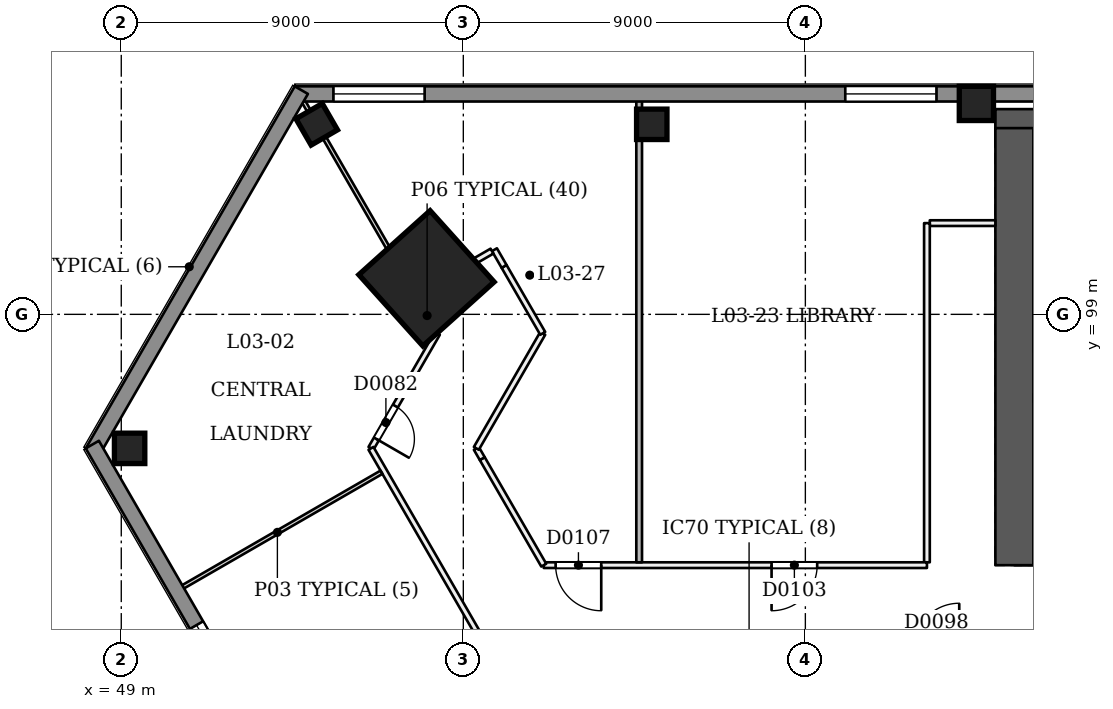
"""IFC4 building model, lengths in metres.
Left out: names, types, materials, properties, quantities, classifications, styles, units other than length and angle.
Written with IfcOpenShell. Run it as: python <this file> out.ifc"""

import sys

from ifc_helpers import new_model, si_unit, direction, frame, frame_2d, origin, origin_2d, place, context, subcontext, project, spatial, rectangle, extrude, element, fill, save


model = new_model("IFC4")
c1 = context("Model", 3, precision=1e-05, world=origin(), true_north=direction((0.0, 1.0)))
c2 = subcontext(c1, "Body", "Model", "MODEL_VIEW")
j1 = project(units=[si_unit("LENGTHUNIT", "METRE"), si_unit("PLANEANGLEUNIT", "RADIAN")], contexts=[c1])
p1 = place(None, origin())
s1 = spatial("IfcSite", under=j1, at=p1, CompositionType="ELEMENT")
p2 = place(p1, origin())
s2 = spatial("IfcBuilding", under=s1, at=p2, CompositionType="ELEMENT")
p3 = place(p2, frame((0.0, 0.0, 18.0)))
s3 = spatial("IfcBuildingStorey", under=s2, at=p3, CompositionType="ELEMENT", Elevation=18.0)
p4 = place(p3, frame((72.5, 92.9, 0.0), z_axis=(0.0, 0.0, 1.0), x_axis=(1.0, 0.0, 0.0)))
e1 = element("IfcWall", 1, at=p4, inside=s3, PredefinedType="SHEAR", context=c2, shape_type="SweptSolid", body=[
    extrude(rectangle(XDim=25.5, YDim=1.0, at=frame_2d((12.75, 0.0))), origin(), (0.0, 0.0, 1.0), 4.5),
])
p5 = place(p4, frame((1.3, 0.0, 0.0)))
e2 = element("IfcOpeningElement", 2, at=p5, cuts=e1, PredefinedType="OPENING", context=c2, shape_type="SweptSolid", body=[
    extrude(rectangle(XDim=1.2, YDim=2.1, at=frame_2d((0.6, 1.05))), frame((0.0, 0.51, 0.0), z_axis=(0.0, -1.0, 0.0), x_axis=(1.0, 0.0, 0.0)), (0.0, 0.0, 1.0), 1.021),
])
p6 = place(p4, frame((3.5, 0.0, 0.0)))
e3 = element("IfcOpeningElement", 3, at=p6, cuts=e1, PredefinedType="OPENING", context=c2, shape_type="SweptSolid", body=[
    extrude(rectangle(XDim=1.2, YDim=2.1, at=frame_2d((0.6, 1.05))), frame((0.0, 0.51, 0.0), z_axis=(0.0, -1.0, 0.0), x_axis=(1.0, 0.0, 0.0)), (0.0, 0.0, 1.0), 1.021),
])
p7 = place(p4, frame((13.5, 0.0, 0.0)))
e4 = element("IfcOpeningElement", 4, at=p7, cuts=e1, PredefinedType="OPENING", context=c2, shape_type="SweptSolid", body=[
    extrude(rectangle(XDim=1.2, YDim=2.1, at=frame_2d((0.6, 1.05))), frame((0.0, 0.51, 0.0), z_axis=(0.0, -1.0, 0.0), x_axis=(1.0, 0.0, 0.0)), (0.0, 0.0, 1.0), 1.021),
])
p8 = place(p4, frame((15.562, 0.0, 0.0)))
e5 = element("IfcOpeningElement", 5, at=p8, cuts=e1, PredefinedType="OPENING", context=c2, shape_type="SweptSolid", body=[
    extrude(rectangle(XDim=1.0, YDim=2.1, at=frame_2d((0.5, 1.05))), frame((0.0, 0.51, 0.0), z_axis=(0.0, -1.0, 0.0), x_axis=(1.0, 0.0, 0.0)), (0.0, 0.0, 1.0), 1.021),
])
p9 = place(p4, frame((17.8, 0.0, 0.0)))
e6 = element("IfcOpeningElement", 6, at=p9, cuts=e1, PredefinedType="OPENING", context=c2, shape_type="SweptSolid", body=[
    extrude(rectangle(XDim=1.0, YDim=2.1, at=frame_2d((0.5, 1.05))), frame((0.0, 0.51, 0.0), z_axis=(0.0, -1.0, 0.0), x_axis=(1.0, 0.0, 0.0)), (0.0, 0.0, 1.0), 1.021),
])
p10 = place(p4, frame((20.35, 0.0, 0.0)))
e7 = element("IfcOpeningElement", 7, at=p10, cuts=e1, PredefinedType="OPENING", context=c2, shape_type="SweptSolid", body=[
    extrude(rectangle(XDim=1.0, YDim=2.1, at=frame_2d((0.5, 1.05))), frame((0.0, 0.51, 0.0), z_axis=(0.0, -1.0, 0.0), x_axis=(1.0, 0.0, 0.0)), (0.0, 0.0, 1.0), 1.021),
])
p11 = place(p4, frame((22.837, 0.0, 0.0)))
e8 = element("IfcOpeningElement", 8, at=p11, cuts=e1, PredefinedType="OPENING", context=c2, shape_type="SweptSolid", body=[
    extrude(rectangle(XDim=1.0, YDim=2.1, at=frame_2d((0.5, 1.05))), frame((0.0, 0.51, 0.0), z_axis=(0.0, -1.0, 0.0), x_axis=(1.0, 0.0, 0.0)), (0.0, 0.0, 1.0), 1.021),
])
p12 = place(p3, frame((97.5, 103.9, 0.0), z_axis=(0.0, 0.0, 1.0), x_axis=(-1.0, 0.0, 0.0)))
e9 = element("IfcWall", 9, at=p12, inside=s3, PredefinedType="SHEAR", context=c2, shape_type="SweptSolid", body=[
    extrude(rectangle(XDim=25.5, YDim=1.0, at=frame_2d((12.75, 0.0))), origin(), (0.0, 0.0, 1.0), 4.5),
])
p13 = place(p3, frame((72.5, 103.9, 0.0), z_axis=(0.0, 0.0, 1.0), x_axis=(0.0, -1.0, 0.0)))
e10 = element("IfcWall", 10, at=p13, inside=s3, PredefinedType="SHEAR", context=c2, shape_type="SweptSolid", body=[
    extrude(rectangle(XDim=11.5, YDim=1.0, at=frame_2d((5.75, 0.0))), origin(), (0.0, 0.0, 1.0), 4.5),
])
p14 = place(p3, frame((56.997, 99.937, 0.0), z_axis=(0.028416116488, 0.009273198319, 0.999553166228), x_axis=(-0.865919141901, 0.499784777633, 0.019980383755)))
e11 = element("IfcColumn", 11, at=p14, inside=s3, PredefinedType="COLUMN", context=c2, shape_type="SweptSolid", body=[
    extrude(rectangle(XDim=2.52, YDim=2.52, at=origin_2d()), origin(), (0.0, 0.0, 1.0), 4.502),
])
p15 = place(p3, frame((71.5, 104.55, 0.0), z_axis=(0.0, 0.0, 1.0), x_axis=(1.0, 0.0, 0.0)))
e12 = element("IfcColumn", 12, at=p15, inside=s3, PredefinedType="COLUMN", context=c2, shape_type="SweptSolid", body=[
    extrude(rectangle(XDim=0.9, YDim=0.9, at=origin_2d()), origin(), (0.0, 0.0, 1.0), 4.5),
])
for number, where, z_axis, x_axis in (
    (13, (62.959, 104.0, 0.0), (0.0, 0.0, 1.0), (1.0, 0.0, 0.0)),
    (14, (54.142, 104.0, 0.0), (0.0, 0.0, 1.0), (0.866, 0.5, 0.0)),
    (15, (49.219, 95.474, 0.0), (0.0, 0.0, 1.0), (1.0, 1.745e-08, 0.0)),
):
    element("IfcColumn", number, at=place(p3, frame(where, z_axis=z_axis, x_axis=x_axis)), inside=s3, PredefinedType="COLUMN", context=c2, shape_type="SweptSolid", body=[
        extrude(rectangle(XDim=0.8, YDim=0.8, at=origin_2d()), origin(), (0.0, 0.0, 1.0), 4.5),
    ])
p16 = place(p3, frame((56.777, 99.436, 0.0), z_axis=(0.0, 0.0, 1.0), x_axis=(0.500172206961, -0.865925957218, 0.0)))
e16 = element("IfcWall", 16, at=p16, inside=s3, PredefinedType="PARTITIONING", context=c2, shape_type="SweptSolid", body=[
    extrude(rectangle(XDim=1.081, YDim=0.15, at=frame_2d((0.54, 0.0))), origin(), (0.0, 0.0, 1.0), 3.55),
])
p17 = place(p3, frame((57.318, 98.5, 0.0), z_axis=(0.0, 0.0, 1.0), x_axis=(-0.500038954607, -0.866002912163, 0.0)))
e17 = element("IfcWall", 17, at=p17, inside=s3, PredefinedType="PARTITIONING", context=c2, shape_type="SweptSolid", body=[
    extrude(rectangle(XDim=3.494, YDim=0.15, at=frame_2d((1.747, 0.0))), origin(), (0.0, 0.0, 1.0), 3.55),
])
p18 = place(p17, frame((2.209, 0.0, 0.0)))
e18 = element("IfcOpeningElement", 18, at=p18, cuts=e17, PredefinedType="OPENING", context=c2, shape_type="SweptSolid", body=[
    extrude(rectangle(XDim=1.0, YDim=2.1, at=frame_2d((0.5, 1.05))), frame((0.0, 0.085, 0.0), z_axis=(0.0, -1.0, 0.0), x_axis=(1.0, 0.0, 0.0)), (0.0, 0.0, 1.0), 0.171),
])
p19 = place(p3, frame((55.57, 95.474, 0.0), z_axis=(0.0, 0.0, 1.0), x_axis=(0.500000085768, -0.866025354266, 0.0)))
e19 = element("IfcWall", 19, at=p19, inside=s3, PredefinedType="PARTITIONING", context=c2, shape_type="SweptSolid", body=[
    extrude(rectangle(XDim=55.365, YDim=0.15, at=frame_2d((27.682, 0.0))), origin(), (0.0, 0.0, 1.0), 3.55),
])
p20 = place(p19, frame((9.082, 0.0, 0.0)))
e20 = element("IfcOpeningElement", 20, at=p20, cuts=e19, PredefinedType="OPENING", context=c2, shape_type="SweptSolid", body=[
    extrude(rectangle(XDim=1.2, YDim=2.1, at=frame_2d((0.6, 1.05))), frame((0.0, 0.085, 0.0), z_axis=(0.0, -1.0, 0.0), x_axis=(1.0, 0.0, 0.0)), (0.0, 0.0, 1.0), 0.171),
])
p21 = place(p19, frame((18.906, 0.0, 0.0)))
e21 = element("IfcOpeningElement", 21, at=p21, cuts=e19, PredefinedType="OPENING", context=c2, shape_type="SweptSolid", body=[
    extrude(rectangle(XDim=0.9, YDim=2.1, at=frame_2d((0.45, 1.05))), frame((0.0, 0.085, 0.0), z_axis=(0.0, -1.0, 0.0), x_axis=(1.0, 0.0, 0.0)), (0.0, 0.0, 1.0), 0.171),
])
p22 = place(p19, frame((21.856, 0.0, 0.0)))
e22 = element("IfcOpeningElement", 22, at=p22, cuts=e19, PredefinedType="OPENING", context=c2, shape_type="SweptSolid", body=[
    extrude(rectangle(XDim=0.9, YDim=2.1, at=frame_2d((0.45, 1.05))), frame((0.0, 0.085, 0.0), z_axis=(0.0, -1.0, 0.0), x_axis=(1.0, 0.0, 0.0)), (0.0, 0.0, 1.0), 0.171),
])
p23 = place(p19, frame((31.582, 0.0, 0.0)))
e23 = element("IfcOpeningElement", 23, at=p23, cuts=e19, PredefinedType="OPENING", context=c2, shape_type="SweptSolid", body=[
    extrude(rectangle(XDim=1.2, YDim=2.1, at=frame_2d((0.6, 1.05))), frame((0.0, 0.085, 0.0), z_axis=(0.0, -1.0, 0.0), x_axis=(1.0, 0.0, 0.0)), (0.0, 0.0, 1.0), 0.171),
])
p24 = place(p19, frame((45.082, 0.0, 0.0)))
e24 = element("IfcOpeningElement", 24, at=p24, cuts=e19, PredefinedType="OPENING", context=c2, shape_type="SweptSolid", body=[
    extrude(rectangle(XDim=1.2, YDim=2.1, at=frame_2d((0.6, 1.05))), frame((0.0, 0.085, 0.0), z_axis=(0.0, -1.0, 0.0), x_axis=(1.0, 0.0, 0.0)), (0.0, 0.0, 1.0), 0.171),
])
p25 = place(p19, frame((53.195, 0.0, 0.0)))
e25 = element("IfcOpeningElement", 25, at=p25, cuts=e19, PredefinedType="OPENING", context=c2, shape_type="SweptSolid", body=[
    extrude(rectangle(XDim=1.2, YDim=2.1, at=frame_2d((0.6, 1.05))), frame((0.0, 0.085, 0.0), z_axis=(0.0, -1.0, 0.0), x_axis=(1.0, 0.0, 0.0)), (0.0, 0.0, 1.0), 0.171),
])
p26 = place(p3, frame((72.0, 101.401, 0.0), z_axis=(0.0, 0.0, 1.0), x_axis=(-0.999999909973, -0.000424328109, 0.0)))
e26 = element("IfcWall", 26, at=p26, inside=s3, PredefinedType="PARTITIONING", context=c2, shape_type="SweptSolid", body=[
    extrude(rectangle(XDim=1.726, YDim=0.15, at=frame_2d((0.863, 0.0))), origin(), (0.0, 0.0, 1.0), 4.05),
])
p27 = place(p3, frame((70.199, 101.4, 0.0), z_axis=(0.0, 0.0, 1.0), x_axis=(0.0, -1.0, 0.0)))
e27 = element("IfcWall", 27, at=p27, inside=s3, PredefinedType="PARTITIONING", context=c2, shape_type="SweptSolid", body=[
    extrude(rectangle(XDim=8.924, YDim=0.15, at=frame_2d((4.462, 0.0))), origin(), (0.0, 0.0, 1.0), 4.05),
])
p28 = place(p3, frame((70.199, 92.401, 0.0), z_axis=(0.0, 0.0, 1.0), x_axis=(-1.0, 0.0, 0.0)))
e28 = element("IfcWall", 28, at=p28, inside=s3, PredefinedType="PARTITIONING", context=c2, shape_type="SweptSolid", body=[
    extrude(rectangle(XDim=10.082, YDim=0.15, at=frame_2d((5.041, 0.0))), origin(), (0.0, 0.0, 1.0), 4.05),
])
p29 = place(p28, frame((2.888, 0.0, 0.0)))
e29 = element("IfcOpeningElement", 29, at=p29, cuts=e28, PredefinedType="OPENING", context=c2, shape_type="SweptSolid", body=[
    extrude(rectangle(XDim=1.2, YDim=2.1, at=frame_2d((0.6, 1.05))), frame((0.0, 0.085, 0.0), z_axis=(0.0, -1.0, 0.0), x_axis=(1.0, 0.0, 0.0)), (0.0, 0.0, 1.0), 0.171),
])
p30 = place(p28, frame((8.57, 0.0, 0.0)))
e30 = element("IfcOpeningElement", 30, at=p30, cuts=e28, PredefinedType="OPENING", context=c2, shape_type="SweptSolid", body=[
    extrude(rectangle(XDim=1.2, YDim=2.1, at=frame_2d((0.6, 1.05))), frame((0.0, 0.085, 0.0), z_axis=(0.0, -1.0, 0.0), x_axis=(1.0, 0.0, 0.0)), (0.0, 0.0, 1.0), 0.171),
])
p31 = place(p3, frame((60.117, 92.401, 0.0), z_axis=(0.0, 0.0, 1.0), x_axis=(-0.499968406128, 0.866043643747, 0.0)))
e31 = element("IfcWall", 31, at=p31, inside=s3, PredefinedType="PARTITIONING", context=c2, shape_type="SweptSolid", body=[
    extrude(rectangle(XDim=3.237, YDim=0.15, at=frame_2d((1.618, 0.0))), origin(), (0.0, 0.0, 1.0), 4.05),
])
p32 = place(p3, frame((58.499, 95.204, 0.0), z_axis=(0.0, 0.0, 1.0), x_axis=(-0.500016430238, 0.866015917575, 0.0)))
e32 = element("IfcWall", 32, at=p32, inside=s3, PredefinedType="PARTITIONING", context=c2, shape_type="SweptSolid", body=[
    extrude(rectangle(XDim=0.312, YDim=0.15, at=frame_2d((0.156, 0.0))), origin(), (0.0, 0.0, 1.0), 3.55),
])
p33 = place(p3, frame((58.343, 95.474, 0.0), z_axis=(0.0, 0.0, 1.0), x_axis=(0.499956301907, 0.86605063142, 0.0)))
e33 = element("IfcWall", 33, at=p33, inside=s3, PredefinedType="PARTITIONING", context=c2, shape_type="SweptSolid", body=[
    extrude(rectangle(XDim=3.494, YDim=0.15, at=frame_2d((1.747, 0.0))), origin(), (0.0, 0.0, 1.0), 3.55),
])
p34 = place(p3, frame((60.09, 98.5, 0.0), z_axis=(0.0, 0.0, 1.0), x_axis=(-0.499933676373, 0.866063692362, 0.0)))
e34 = element("IfcWall", 34, at=p34, inside=s3, PredefinedType="PARTITIONING", context=c2, shape_type="SweptSolid", body=[
    extrude(rectangle(XDim=2.034, YDim=0.15, at=frame_2d((1.017, 0.0))), origin(), (0.0, 0.0, 1.0), 4.05),
])
p35 = place(p3, frame((59.073, 100.262, 0.0), z_axis=(0.0, 0.0, 1.0), x_axis=(-0.500181256421, 0.865920730047, 0.0)))
e35 = element("IfcWall", 35, at=p35, inside=s3, PredefinedType="PARTITIONING", context=c2, shape_type="SweptSolid", body=[
    extrude(rectangle(XDim=0.507, YDim=0.15, at=frame_2d((0.253, 0.0))), origin(), (0.0, 0.0, 1.0), 3.55),
])
p36 = place(p3, frame((58.754, 100.663, 0.0), z_axis=(0.0, 0.0, 1.0), x_axis=(-0.866220535422, -0.499661869681, 0.0)))
e36 = element("IfcWall", 36, at=p36, inside=s3, PredefinedType="PARTITIONING", context=c2, shape_type="SweptSolid", body=[
    extrude(rectangle(XDim=2.326, YDim=0.15, at=frame_2d((1.163, 0.0))), origin(), (0.0, 0.0, 1.0), 3.55),
])
p37 = place(p3, frame((50.369, 91.683, 0.0), z_axis=(0.0, 0.0, 1.0), x_axis=(0.866025537322, 0.499999768706, 0.0)))
e37 = element("IfcWall", 37, at=p37, inside=s3, PredefinedType="PARTITIONING", context=c2, shape_type="SweptSolid", body=[
    extrude(rectangle(XDim=6.325, YDim=0.1, at=frame_2d((3.163, 0.0))), origin(), (0.0, 0.0, 1.0), 4.05),
])
p38 = place(p3, frame((56.74, 99.501, 0.0), z_axis=(0.0, 0.0, 1.0), x_axis=(-0.500013984911, 0.866017329442, 0.0)))
e38 = element("IfcWall", 38, at=p38, inside=s3, PredefinedType="PARTITIONING", context=c2, shape_type="SweptSolid", body=[
    extrude(rectangle(XDim=6.234, YDim=0.1, at=frame_2d((3.117, 0.0))), origin(), (0.0, 0.0, 1.0), 4.05),
])
p39 = place(p3, frame((62.627, 104.9, 0.0), z_axis=(0.0, 0.0, 1.0), x_axis=(0.0, -1.0, 0.0)))
e39 = element("IfcWall", 39, at=p39, inside=s3, PredefinedType="PARTITIONING", context=c2, shape_type="SweptSolid", body=[
    extrude(rectangle(XDim=12.424, YDim=0.15, at=frame_2d((6.212, 0.0))), origin(), (0.0, 0.0, 1.0), 3.55),
])
p40 = place(p3, frame((53.565, 104.8, 0.0), z_axis=(0.0, 0.0, 1.0), x_axis=(1.0, 0.0, 0.0)))
e40 = element("IfcWall", 40, at=p40, inside=s3, PredefinedType="SOLIDWALL", context=c2, shape_type="SweptSolid", body=[
    extrude(rectangle(XDim=62.871, YDim=0.4, at=frame_2d((31.435, 0.0))), origin(), (0.0, 0.0, 1.0), 3.55),
])
p41 = place(p40, frame((59.452, 0.0, 0.9)))
e41 = element("IfcOpeningElement", 41, at=p41, cuts=e40, PredefinedType="OPENING", context=c2, shape_type="SweptSolid", body=[
    extrude(rectangle(XDim=2.4, YDim=1.5, at=frame_2d((1.2, 0.75))), frame((0.0, 0.21, 0.0), z_axis=(0.0, -1.0, 0.0), x_axis=(1.0, 0.0, 0.0)), (0.0, 0.0, 1.0), 0.421),
])
p42 = place(p40, frame((54.986, 0.0, 0.9)))
e42 = element("IfcOpeningElement", 42, at=p42, cuts=e40, PredefinedType="OPENING", context=c2, shape_type="SweptSolid", body=[
    extrude(rectangle(XDim=2.4, YDim=1.5, at=frame_2d((1.2, 0.75))), frame((0.0, 0.21, 0.0), z_axis=(0.0, -1.0, 0.0), x_axis=(1.0, 0.0, 0.0)), (0.0, 0.0, 1.0), 0.421),
])
p43 = place(p40, frame((45.986, 0.0, 0.9)))
e43 = element("IfcOpeningElement", 43, at=p43, cuts=e40, PredefinedType="OPENING", context=c2, shape_type="SweptSolid", body=[
    extrude(rectangle(XDim=2.4, YDim=1.5, at=frame_2d((1.2, 0.75))), frame((0.0, 0.21, 0.0), z_axis=(0.0, -1.0, 0.0), x_axis=(1.0, 0.0, 0.0)), (0.0, 0.0, 1.0), 0.421),
])
p44 = place(p40, frame((14.486, 0.0, 0.9)))
e44 = element("IfcOpeningElement", 44, at=p44, cuts=e40, PredefinedType="OPENING", context=c2, shape_type="SweptSolid", body=[
    extrude(rectangle(XDim=2.4, YDim=1.5, at=frame_2d((1.2, 0.75))), frame((0.0, 0.21, 0.0), z_axis=(0.0, -1.0, 0.0), x_axis=(1.0, 0.0, 0.0)), (0.0, 0.0, 1.0), 0.421),
])
p45 = place(p40, frame((1.018, 0.0, 0.9)))
e45 = element("IfcOpeningElement", 45, at=p45, cuts=e40, PredefinedType="OPENING", context=c2, shape_type="SweptSolid", body=[
    extrude(rectangle(XDim=2.4, YDim=1.5, at=frame_2d((1.2, 0.75))), frame((0.0, 0.21, 0.0), z_axis=(0.0, -1.0, 0.0), x_axis=(1.0, 0.0, 0.0)), (0.0, 0.0, 1.0), 0.421),
])
p46 = place(p3, frame((48.238, 95.374, 0.0), z_axis=(0.0, 0.0, 1.0), x_axis=(0.50000615651, 0.866021849293, 0.0)))
e46 = element("IfcWall", 46, at=p46, inside=s3, PredefinedType="SOLIDWALL", context=c2, shape_type="SweptSolid", body=[
    extrude(rectangle(XDim=11.0, YDim=0.4, at=frame_2d((5.5, 0.0))), origin(), (0.0, 0.0, 1.0), 3.55),
])
p47 = place(p3, frame((79.673, 41.126, 0.0), z_axis=(0.0, 0.0, 1.0), x_axis=(-0.499997306052, 0.866026959131, 0.0)))
e47 = element("IfcWall", 47, at=p47, inside=s3, PredefinedType="SOLIDWALL", context=c2, shape_type="SweptSolid", body=[
    extrude(rectangle(XDim=62.87, YDim=0.4, at=frame_2d((31.435, 0.0))), origin(), (0.0, 0.0, 1.0), 3.55),
])
p48 = place(p47, frame((54.986, 0.0, 0.9)))
e48 = element("IfcOpeningElement", 48, at=p48, cuts=e47, PredefinedType="OPENING", context=c2, shape_type="SweptSolid", body=[
    extrude(rectangle(XDim=2.4, YDim=1.5, at=frame_2d((1.2, 0.75))), frame((0.0, 0.21, 0.0), z_axis=(0.0, -1.0, 0.0), x_axis=(1.0, 0.0, 0.0)), (0.0, 0.0, 1.0), 0.421),
])
p49 = place(p47, frame((50.486, 0.0, 0.9)))
e49 = element("IfcOpeningElement", 49, at=p49, cuts=e47, PredefinedType="OPENING", context=c2, shape_type="SweptSolid", body=[
    extrude(rectangle(XDim=2.4, YDim=1.5, at=frame_2d((1.2, 0.75))), frame((0.0, 0.21, 0.0), z_axis=(0.0, -1.0, 0.0), x_axis=(1.0, 0.0, 0.0)), (0.0, 0.0, 1.0), 0.421),
])
p50 = place(p47, frame((45.986, 0.0, 0.9)))
e50 = element("IfcOpeningElement", 50, at=p50, cuts=e47, PredefinedType="OPENING", context=c2, shape_type="SweptSolid", body=[
    extrude(rectangle(XDim=2.4, YDim=1.5, at=frame_2d((1.2, 0.75))), frame((0.0, 0.21, 0.0), z_axis=(0.0, -1.0, 0.0), x_axis=(1.0, 0.0, 0.0)), (0.0, 0.0, 1.0), 0.421),
])
p51 = place(p47, frame((32.486, 0.0, 0.9)))
e51 = element("IfcOpeningElement", 51, at=p51, cuts=e47, PredefinedType="OPENING", context=c2, shape_type="SweptSolid", body=[
    extrude(rectangle(XDim=2.4, YDim=1.5, at=frame_2d((1.2, 0.75))), frame((0.0, 0.21, 0.0), z_axis=(0.0, -1.0, 0.0), x_axis=(1.0, 0.0, 0.0)), (0.0, 0.0, 1.0), 0.421),
])
p52 = place(p47, frame((27.986, 0.0, 0.9)))
e52 = element("IfcOpeningElement", 52, at=p52, cuts=e47, PredefinedType="OPENING", context=c2, shape_type="SweptSolid", body=[
    extrude(rectangle(XDim=2.4, YDim=1.5, at=frame_2d((1.2, 0.75))), frame((0.0, 0.21, 0.0), z_axis=(0.0, -1.0, 0.0), x_axis=(1.0, 0.0, 0.0)), (0.0, 0.0, 1.0), 0.421),
])
p53 = place(p47, frame((23.486, 0.0, 0.9)))
e53 = element("IfcOpeningElement", 53, at=p53, cuts=e47, PredefinedType="OPENING", context=c2, shape_type="SweptSolid", body=[
    extrude(rectangle(XDim=2.4, YDim=1.5, at=frame_2d((1.2, 0.75))), frame((0.0, 0.21, 0.0), z_axis=(0.0, -1.0, 0.0), x_axis=(1.0, 0.0, 0.0)), (0.0, 0.0, 1.0), 0.421),
])
p54 = place(p47, frame((18.986, 0.0, 0.9)))
e54 = element("IfcOpeningElement", 54, at=p54, cuts=e47, PredefinedType="OPENING", context=c2, shape_type="SweptSolid", body=[
    extrude(rectangle(XDim=2.4, YDim=1.5, at=frame_2d((1.2, 0.75))), frame((0.0, 0.21, 0.0), z_axis=(0.0, -1.0, 0.0), x_axis=(1.0, 0.0, 0.0)), (0.0, 0.0, 1.0), 0.421),
])
p55 = place(p47, frame((14.486, 0.0, 0.9)))
e55 = element("IfcOpeningElement", 55, at=p55, cuts=e47, PredefinedType="OPENING", context=c2, shape_type="SweptSolid", body=[
    extrude(rectangle(XDim=2.4, YDim=1.5, at=frame_2d((1.2, 0.75))), frame((0.0, 0.21, 0.0), z_axis=(0.0, -1.0, 0.0), x_axis=(1.0, 0.0, 0.0)), (0.0, 0.0, 1.0), 0.421),
])
p56 = place(p18, origin())
e56 = element("IfcDoor", 56, at=p56, inside=s3, OperationType="SINGLE_SWING_RIGHT", PredefinedType="NOTDEFINED", context=c2, shape_type="SweptSolid", body=[
    extrude(rectangle(XDim=1.0, YDim=2.1, at=frame_2d((0.5, 1.05))), frame((0.0, 0.025, 0.0), z_axis=(0.0, -1.0, 0.0), x_axis=(1.0, 0.0, 0.0)), (0.0, 0.0, 1.0), 0.05),
])
fill(e18, e56)
p57 = place(p29, origin())
e57 = element("IfcDoor", 57, at=p57, inside=s3, OperationType="SINGLE_SWING_RIGHT", PredefinedType="NOTDEFINED", context=c2, shape_type="SweptSolid", body=[
    extrude(rectangle(XDim=1.2, YDim=2.1, at=frame_2d((0.6, 1.05))), frame((0.0, 0.025, 0.0), z_axis=(0.0, -1.0, 0.0), x_axis=(1.0, 0.0, 0.0)), (0.0, 0.0, 1.0), 0.05),
])
fill(e29, e57)
p58 = place(p30, origin())
e58 = element("IfcDoor", 58, at=p58, inside=s3, OperationType="SINGLE_SWING_LEFT", PredefinedType="NOTDEFINED", context=c2, shape_type="SweptSolid", body=[
    extrude(rectangle(XDim=1.2, YDim=2.1, at=frame_2d((0.6, 1.05))), frame((0.0, 0.025, 0.0), z_axis=(0.0, -1.0, 0.0), x_axis=(1.0, 0.0, 0.0)), (0.0, 0.0, 1.0), 0.05),
])
fill(e30, e58)
p59 = place(p44, origin())
e59 = element("IfcWindow", 59, at=p59, inside=s3, PartitioningType="SINGLE_PANEL", PredefinedType="WINDOW", context=c2, shape_type="SweptSolid", body=[
    extrude(rectangle(XDim=2.4, YDim=1.5, at=frame_2d((1.2, 0.75))), frame((0.0, 0.03, 0.0), z_axis=(0.0, -1.0, 0.0), x_axis=(1.0, 0.0, 0.0)), (0.0, 0.0, 1.0), 0.06),
])
fill(e44, e59)
p60 = place(p45, origin())
e60 = element("IfcWindow", 60, at=p60, inside=s3, PartitioningType="SINGLE_PANEL", PredefinedType="WINDOW", context=c2, shape_type="SweptSolid", body=[
    extrude(rectangle(XDim=2.4, YDim=1.5, at=frame_2d((1.2, 0.75))), frame((0.0, 0.03, 0.0), z_axis=(0.0, -1.0, 0.0), x_axis=(1.0, 0.0, 0.0)), (0.0, 0.0, 1.0), 0.06),
])
fill(e45, e60)
p61 = place(p48, origin())
e61 = element("IfcWindow", 61, at=p61, inside=s3, PartitioningType="SINGLE_PANEL", PredefinedType="WINDOW", context=c2, shape_type="SweptSolid", body=[
    extrude(rectangle(XDim=2.4, YDim=1.5, at=frame_2d((1.2, 0.75))), frame((0.0, 0.03, 0.0), z_axis=(0.0, -1.0, 0.0), x_axis=(1.0, 0.0, 0.0)), (0.0, 0.0, 1.0), 0.06),
])
fill(e48, e61)
save(model, sys.argv[1])
